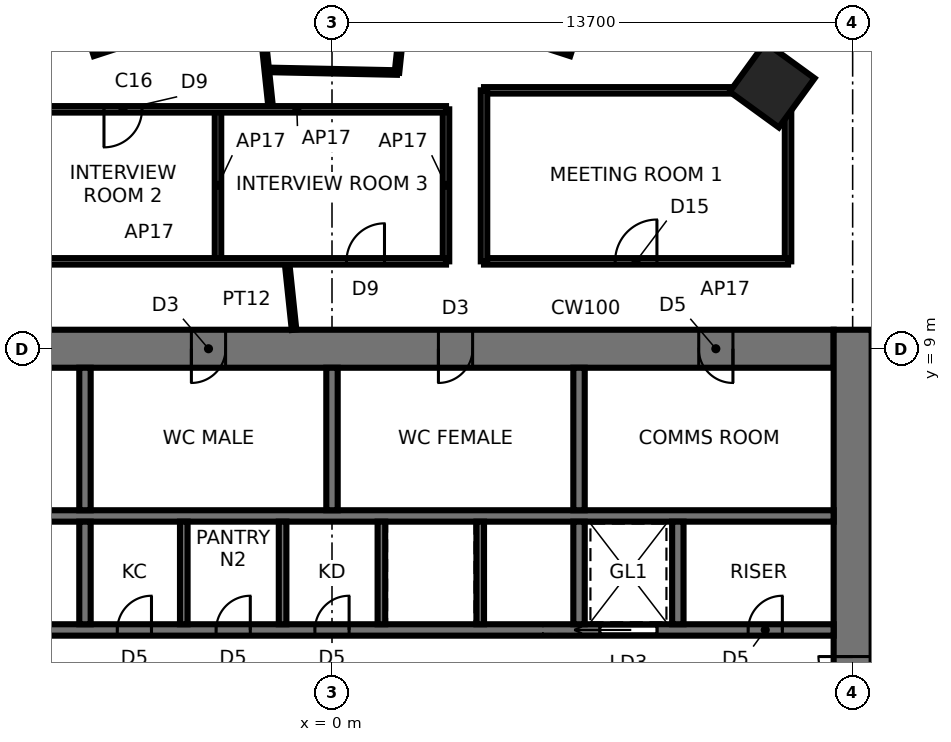
"""IFC4 building model, lengths in metres.
Left out: names, types, materials, properties, quantities, classifications, styles, units other than length and angle.
Written with IfcOpenShell. Run it as: python <this file> out.ifc"""

import sys

from ifc_helpers import new_model, si_unit, direction, frame, frame_2d, origin, origin_2d, place, context, subcontext, project, spatial, rectangle, extrude, element, fill, save


model = new_model("IFC4")
c1 = context("Model", 3, precision=1e-05, world=origin(), true_north=direction((0.0, 1.0)))
c2 = subcontext(c1, "Body", "Model", "MODEL_VIEW")
j1 = project(units=[si_unit("LENGTHUNIT", "METRE"), si_unit("PLANEANGLEUNIT", "RADIAN")], contexts=[c1])
p1 = place(None, origin())
s1 = spatial("IfcSite", under=j1, at=p1, CompositionType="ELEMENT")
p2 = place(p1, origin())
s2 = spatial("IfcBuilding", under=s1, at=p2, CompositionType="ELEMENT")
p3 = place(p2, frame((0.0, 0.0, 92.4)))
s3 = spatial("IfcBuildingStorey", under=s2, at=p3, CompositionType="ELEMENT", Elevation=92.4)
for number, where, z_axis, x_axis in (
    (1, (11.581, 15.94, 0.0), (0.0, 0.0, 1.0), (0.588, 0.809, 0.0)),
    (2, (5.754, 17.708, 0.0), (0.0, 0.0, 1.0), (0.309, 0.951, 0.0)),
    (3, (-5.754, 17.708, 0.0), (0.0, 0.0, 1.0), (-0.309, 0.951, 0.0)),
):
    element("IfcColumn", number, at=place(p3, frame(where, z_axis=z_axis, x_axis=x_axis)), inside=s3, PredefinedType="COLUMN", context=c2, shape_type="SweptSolid", body=[
        extrude(rectangle(XDim=1.6, YDim=1.6, at=origin_2d()), origin(), (0.0, 0.0, 1.0), 3.9),
    ])
p4 = place(p3, frame((13.2, 9.0, 0.0), z_axis=(0.0, 0.0, 1.0), x_axis=(-1.0, 0.0, 0.0)))
e4 = element("IfcWall", 4, at=p4, inside=s3, PredefinedType="SHEAR", context=c2, shape_type="SweptSolid", body=[
    extrude(rectangle(XDim=26.4, YDim=1.0, at=frame_2d((13.2, 0.0))), origin(), (0.0, 0.0, 1.0), 3.9),
])
p5 = place(p4, frame((2.65, 0.0, 0.0)))
e5 = element("IfcOpeningElement", 5, at=p5, cuts=e4, PredefinedType="OPENING", context=c2, shape_type="SweptSolid", body=[
    extrude(rectangle(XDim=0.9, YDim=2.1, at=frame_2d((0.45, 1.05))), frame((0.0, 0.51, 0.0), z_axis=(0.0, -1.0, 0.0), x_axis=(1.0, 0.0, 0.0)), (0.0, 0.0, 1.0), 1.02),
])
p6 = place(p4, frame((9.5, 0.0, 0.0)))
e6 = element("IfcOpeningElement", 6, at=p6, cuts=e4, PredefinedType="OPENING", context=c2, shape_type="SweptSolid", body=[
    extrude(rectangle(XDim=0.9, YDim=2.1, at=frame_2d((0.45, 1.05))), frame((0.0, 0.51, 0.0), z_axis=(0.0, -1.0, 0.0), x_axis=(1.0, 0.0, 0.0)), (0.0, 0.0, 1.0), 1.02),
])
p7 = place(p4, frame((16.0, 0.0, 0.0)))
e7 = element("IfcOpeningElement", 7, at=p7, cuts=e4, PredefinedType="OPENING", context=c2, shape_type="SweptSolid", body=[
    extrude(rectangle(XDim=0.9, YDim=2.1, at=frame_2d((0.45, 1.05))), frame((0.0, 0.51, 0.0), z_axis=(0.0, -1.0, 0.0), x_axis=(1.0, 0.0, 0.0)), (0.0, 0.0, 1.0), 1.02),
])
p8 = place(p4, frame((21.25, 0.0, 0.0)))
e8 = element("IfcOpeningElement", 8, at=p8, cuts=e4, PredefinedType="OPENING", context=c2, shape_type="SweptSolid", body=[
    extrude(rectangle(XDim=0.9, YDim=2.1, at=frame_2d((0.45, 1.05))), frame((0.0, 0.51, 0.0), z_axis=(0.0, -1.0, 0.0), x_axis=(1.0, 0.0, 0.0)), (0.0, 0.0, 1.0), 1.02),
])
p9 = place(p4, frame((24.8, 0.0, 0.0)))
e9 = element("IfcOpeningElement", 9, at=p9, cuts=e4, PredefinedType="OPENING", context=c2, shape_type="SweptSolid", body=[
    extrude(rectangle(XDim=1.0, YDim=2.1, at=frame_2d((0.5, 1.05))), frame((0.0, 0.51, 0.0), z_axis=(0.0, -1.0, 0.0), x_axis=(1.0, 0.0, 0.0)), (0.0, 0.0, 1.0), 1.02),
])
p10 = place(p3, frame((13.7, -9.5, 0.0), z_axis=(0.0, 0.0, 1.0), x_axis=(0.0, 1.0, 0.0)))
e10 = element("IfcWall", 10, at=p10, inside=s3, PredefinedType="SHEAR", context=c2, shape_type="SweptSolid", body=[
    extrude(rectangle(XDim=19.0, YDim=1.0, at=frame_2d((9.5, 0.0))), origin(), (0.0, 0.0, 1.0), 3.9),
])
p11 = place(p10, frame((8.6, 0.0, 0.0)))
e11 = element("IfcOpeningElement", 11, at=p11, cuts=e10, PredefinedType="OPENING", context=c2, shape_type="SweptSolid", body=[
    extrude(rectangle(XDim=1.8, YDim=2.4, at=frame_2d((0.9, 1.2))), frame((0.0, 0.51, 0.0), z_axis=(0.0, -1.0, 0.0), x_axis=(1.0, 0.0, 0.0)), (0.0, 0.0, 1.0), 1.02),
])
p12 = place(p3, frame((-13.2, 1.6, 0.0), z_axis=(0.0, 0.0, 1.0), x_axis=(1.0, 0.0, 0.0)))
e12 = element("IfcWall", 12, at=p12, inside=s3, PredefinedType="SHEAR", context=c2, shape_type="SweptSolid", body=[
    extrude(rectangle(XDim=26.4, YDim=0.3, at=frame_2d((13.2, 0.0))), origin(), (0.0, 0.0, 1.0), 3.9),
])
p13 = place(p12, frame((0.25, 0.0, 0.0)))
e13 = element("IfcOpeningElement", 13, at=p13, cuts=e12, PredefinedType="OPENING", context=c2, shape_type="SweptSolid", body=[
    extrude(rectangle(XDim=1.0, YDim=2.1, at=frame_2d((0.5, 1.05))), frame((0.0, 0.16, 0.0), z_axis=(0.0, -1.0, 0.0), x_axis=(1.0, 0.0, 0.0)), (0.0, 0.0, 1.0), 0.32),
])
p14 = place(p12, frame((20.25, 0.0, 0.0)))
e14 = element("IfcOpeningElement", 14, at=p14, cuts=e12, PredefinedType="OPENING", context=c2, shape_type="SweptSolid", body=[
    extrude(rectangle(XDim=1.5, YDim=2.4, at=frame_2d((0.75, 1.2))), frame((0.0, 0.16, 0.0), z_axis=(0.0, -1.0, 0.0), x_axis=(1.0, 0.0, 0.0)), (0.0, 0.0, 1.0), 0.32),
])
p15 = place(p12, frame((7.55, 0.0, 0.0)))
e15 = element("IfcOpeningElement", 15, at=p15, cuts=e12, PredefinedType="OPENING", context=c2, shape_type="SweptSolid", body=[
    extrude(rectangle(XDim=0.9, YDim=2.1, at=frame_2d((0.45, 1.05))), frame((0.0, 0.16, 0.0), z_axis=(0.0, -1.0, 0.0), x_axis=(1.0, 0.0, 0.0)), (0.0, 0.0, 1.0), 0.32),
])
p16 = place(p12, frame((10.15, 0.0, 0.0)))
e16 = element("IfcOpeningElement", 16, at=p16, cuts=e12, PredefinedType="OPENING", context=c2, shape_type="SweptSolid", body=[
    extrude(rectangle(XDim=0.9, YDim=2.1, at=frame_2d((0.45, 1.05))), frame((0.0, 0.16, 0.0), z_axis=(0.0, -1.0, 0.0), x_axis=(1.0, 0.0, 0.0)), (0.0, 0.0, 1.0), 0.32),
])
p17 = place(p12, frame((12.75, 0.0, 0.0)))
e17 = element("IfcOpeningElement", 17, at=p17, cuts=e12, PredefinedType="OPENING", context=c2, shape_type="SweptSolid", body=[
    extrude(rectangle(XDim=0.9, YDim=2.1, at=frame_2d((0.45, 1.05))), frame((0.0, 0.16, 0.0), z_axis=(0.0, -1.0, 0.0), x_axis=(1.0, 0.0, 0.0)), (0.0, 0.0, 1.0), 0.32),
])
p18 = place(p12, frame((24.15, 0.0, 0.0)))
e18 = element("IfcOpeningElement", 18, at=p18, cuts=e12, PredefinedType="OPENING", context=c2, shape_type="SweptSolid", body=[
    extrude(rectangle(XDim=0.9, YDim=2.1, at=frame_2d((0.45, 1.05))), frame((0.0, 0.16, 0.0), z_axis=(0.0, -1.0, 0.0), x_axis=(1.0, 0.0, 0.0)), (0.0, 0.0, 1.0), 0.32),
])
p19 = place(p3, frame((-13.2, 4.6, 0.0), z_axis=(0.0, 0.0, 1.0), x_axis=(1.0, 0.0, 0.0)))
e19 = element("IfcWall", 19, at=p19, inside=s3, PredefinedType="SHEAR", context=c2, shape_type="SweptSolid", body=[
    extrude(rectangle(XDim=26.4, YDim=0.3, at=frame_2d((13.2, 0.0))), origin(), (0.0, 0.0, 1.0), 3.9),
])
p20 = place(p3, frame((-6.5, 1.75, 0.0), z_axis=(0.0, 0.0, 1.0), x_axis=(0.0, 1.0, 0.0)))
e20 = element("IfcWall", 20, at=p20, inside=s3, PredefinedType="SHEAR", context=c2, shape_type="SweptSolid", body=[
    extrude(rectangle(XDim=2.7, YDim=0.3, at=frame_2d((1.35, 0.0))), origin(), (0.0, 0.0, 1.0), 3.9),
])
p21 = place(p3, frame((-6.5, 4.75, 0.0), z_axis=(0.0, 0.0, 1.0), x_axis=(0.0, 1.0, 0.0)))
e21 = element("IfcWall", 21, at=p21, inside=s3, PredefinedType="SHEAR", context=c2, shape_type="SweptSolid", body=[
    extrude(rectangle(XDim=3.75, YDim=0.3, at=frame_2d((1.875, 0.0))), origin(), (0.0, 0.0, 1.0), 3.9),
])
p22 = place(p3, frame((6.5, 1.75, 0.0), z_axis=(0.0, 0.0, 1.0), x_axis=(0.0, 1.0, 0.0)))
e22 = element("IfcWall", 22, at=p22, inside=s3, PredefinedType="SHEAR", context=c2, shape_type="SweptSolid", body=[
    extrude(rectangle(XDim=2.7, YDim=0.3, at=frame_2d((1.35, 0.0))), origin(), (0.0, 0.0, 1.0), 3.9),
])
p23 = place(p3, frame((6.5, 4.75, 0.0), z_axis=(0.0, 0.0, 1.0), x_axis=(0.0, 1.0, 0.0)))
e23 = element("IfcWall", 23, at=p23, inside=s3, PredefinedType="SHEAR", context=c2, shape_type="SweptSolid", body=[
    extrude(rectangle(XDim=3.75, YDim=0.3, at=frame_2d((1.875, 0.0))), origin(), (0.0, 0.0, 1.0), 3.9),
])
for number, where, z_axis, x_axis in (
    (24, (-3.9, 1.75, 0.0), (0.0, 0.0, 1.0), (0.0, 1.0, 0.0)),
    (25, (-1.3, 1.75, 0.0), (0.0, 0.0, 1.0), (0.0, 1.0, 0.0)),
    (26, (1.3, 1.75, 0.0), (0.0, 0.0, 1.0), (0.0, 1.0, 0.0)),
    (27, (3.9, 1.75, 0.0), (0.0, 0.0, 1.0), (0.0, 1.0, 0.0)),
):
    element("IfcWall", number, at=place(p3, frame(where, z_axis=z_axis, x_axis=x_axis)), inside=s3, PredefinedType="SHEAR", context=c2, shape_type="SweptSolid", body=[
        extrude(rectangle(XDim=2.7, YDim=0.2, at=frame_2d((1.35, 0.0))), origin(), (0.0, 0.0, 1.0), 3.9),
    ])
p24 = place(p3, frame((0.0, 4.75, 0.0), z_axis=(0.0, 0.0, 1.0), x_axis=(0.0, 1.0, 0.0)))
e28 = element("IfcWall", 28, at=p24, inside=s3, PredefinedType="SHEAR", context=c2, shape_type="SweptSolid", body=[
    extrude(rectangle(XDim=3.75, YDim=0.3, at=frame_2d((1.875, 0.0))), origin(), (0.0, 0.0, 1.0), 3.9),
])
p25 = place(p3, frame((9.1, 1.75, 0.0), z_axis=(0.0, 0.0, 1.0), x_axis=(0.0, 1.0, 0.0)))
e29 = element("IfcWall", 29, at=p25, inside=s3, PredefinedType="SHEAR", context=c2, shape_type="SweptSolid", body=[
    extrude(rectangle(XDim=2.7, YDim=0.3, at=frame_2d((1.35, 0.0))), origin(), (0.0, 0.0, 1.0), 3.9),
])
p26 = place(p3, frame((12.0, 15.8, 0.0), z_axis=(0.0, 0.0, 1.0), x_axis=(0.0, -1.0, 0.0)))
e30 = element("IfcWall", 30, at=p26, inside=s3, PredefinedType="PARTITIONING", context=c2, shape_type="SweptSolid", body=[
    extrude(rectangle(XDim=4.5, YDim=0.17, at=frame_2d((2.25, 0.0))), origin(), (0.0, 0.0, 1.0), 3.74),
])
p27 = place(p3, frame((12.0, 11.3, 0.0), z_axis=(0.0, 0.0, 1.0), x_axis=(-1.0, 0.0, 0.0)))
e31 = element("IfcWall", 31, at=p27, inside=s3, PredefinedType="PARTITIONING", context=c2, shape_type="SweptSolid", body=[
    extrude(rectangle(XDim=8.0, YDim=0.17, at=frame_2d((4.0, 0.0))), origin(), (0.0, 0.0, 1.0), 3.74),
])
p28 = place(p27, frame((3.45, 0.0, 0.0)))
e32 = element("IfcOpeningElement", 32, at=p28, cuts=e31, PredefinedType="OPENING", context=c2, shape_type="SweptSolid", body=[
    extrude(rectangle(XDim=1.1, YDim=2.4, at=frame_2d((0.55, 1.2))), frame((0.0, 0.095, 0.0), z_axis=(0.0, -1.0, 0.0), x_axis=(1.0, 0.0, 0.0)), (0.0, 0.0, 1.0), 0.19),
])
p29 = place(p3, frame((4.0, 15.8, 0.0), z_axis=(0.0, 0.0, 1.0), x_axis=(1.0, 0.0, 0.0)))
e33 = element("IfcWall", 33, at=p29, inside=s3, PredefinedType="PARTITIONING", context=c2, shape_type="SweptSolid", body=[
    extrude(rectangle(XDim=8.0, YDim=0.17, at=frame_2d((4.0, 0.0))), origin(), (0.0, 0.0, 1.0), 3.74),
])
p30 = place(p3, frame((4.0, 11.3, 0.0), z_axis=(0.0, 0.0, 1.0), x_axis=(0.0, 1.0, 0.0)))
e34 = element("IfcWall", 34, at=p30, inside=s3, PredefinedType="PARTITIONING", context=c2, shape_type="SweptSolid", body=[
    extrude(rectangle(XDim=4.5, YDim=0.17, at=frame_2d((2.25, 0.0))), origin(), (0.0, 0.0, 1.0), 3.74),
])
p31 = place(p3, frame((3.0, 11.3, 0.0), z_axis=(0.0, 0.0, 1.0), x_axis=(0.0, 1.0, 0.0)))
e35 = element("IfcWall", 35, at=p31, inside=s3, PredefinedType="PARTITIONING", context=c2, shape_type="SweptSolid", body=[
    extrude(rectangle(XDim=4.0, YDim=0.17, at=frame_2d((2.0, 0.0))), origin(), (0.0, 0.0, 1.0), 3.74),
])
p32 = place(p3, frame((1.71, 16.269, 0.0), z_axis=(0.0, 0.0, 1.0), x_axis=(0.104534350613, 0.994521276566, 0.0)))
e36 = element("IfcWall", 36, at=p32, inside=s3, PredefinedType="PARTITIONING", context=c2, shape_type="SweptSolid", body=[
    extrude(rectangle(XDim=4.9, YDim=0.12, at=frame_2d((2.45, 0.0))), origin(), (0.0, 0.0, 1.0), 3.74),
])
p33 = place(p32, frame((2.45, 0.0, 0.0)))
e37 = element("IfcOpeningElement", 37, at=p33, cuts=e36, PredefinedType="OPENING", context=c2, shape_type="SweptSolid", body=[
    extrude(rectangle(XDim=1.0, YDim=2.4, at=frame_2d((0.5, 1.2))), frame((0.0, 0.07, 0.0), z_axis=(0.0, -1.0, 0.0), x_axis=(1.0, 0.0, 0.0)), (0.0, 0.0, 1.0), 0.14),
])
p34 = place(p3, frame((-1.717, 16.339, 0.0), z_axis=(0.0, 0.0, 1.0), x_axis=(0.999789618554, -0.020511426852, 0.0)))
e38 = element("IfcWall", 38, at=p34, inside=s3, PredefinedType="PARTITIONING", context=c2, shape_type="SweptSolid", body=[
    extrude(rectangle(XDim=3.428, YDim=0.12, at=frame_2d((1.714, 0.0))), origin(), (0.0, 0.0, 1.0), 3.74),
])
p35 = place(p3, frame((-1.608, 15.3, 0.0), z_axis=(0.0, 0.0, 1.0), x_axis=(-0.104520170215, 0.994522766968, 0.0)))
e39 = element("IfcWall", 39, at=p35, inside=s3, PredefinedType="PARTITIONING", context=c2, shape_type="SweptSolid", body=[
    extrude(rectangle(XDim=5.945, YDim=0.12, at=frame_2d((2.972, 0.0))), origin(), (0.0, 0.0, 1.0), 3.74),
])
p36 = place(p3, frame((-0.999, 9.5, 0.0), z_axis=(0.0, 0.0, 1.0), x_axis=(-0.104537331683, 0.99452096322, 0.0)))
e40 = element("IfcWall", 40, at=p36, inside=s3, PredefinedType="PARTITIONING", context=c2, shape_type="SweptSolid", body=[
    extrude(rectangle(XDim=1.81, YDim=0.12, at=frame_2d((0.905, 0.0))), origin(), (0.0, 0.0, 1.0), 3.74),
])
p37 = place(p3, frame((-3.0, 15.3, 0.0), z_axis=(0.0, 0.0, 1.0), x_axis=(0.0, -1.0, 0.0)))
e41 = element("IfcWall", 41, at=p37, inside=s3, PredefinedType="PARTITIONING", context=c2, shape_type="SweptSolid", body=[
    extrude(rectangle(XDim=4.0, YDim=0.17, at=frame_2d((2.0, 0.0))), origin(), (0.0, 0.0, 1.0), 3.74),
])
p38 = place(p3, frame((3.0, 15.3, 0.0), z_axis=(0.0, 0.0, 1.0), x_axis=(-1.0, 0.0, 0.0)))
e42 = element("IfcWall", 42, at=p38, inside=s3, PredefinedType="PARTITIONING", context=c2, shape_type="SweptSolid", body=[
    extrude(rectangle(XDim=16.0, YDim=0.17, at=frame_2d((8.0, 0.0))), origin(), (0.0, 0.0, 1.0), 3.286),
])
p39 = place(p38, frame((8.0, 0.0, 0.0)))
e43 = element("IfcOpeningElement", 43, at=p39, cuts=e42, PredefinedType="OPENING", context=c2, shape_type="SweptSolid", body=[
    extrude(rectangle(XDim=1.0, YDim=2.4, at=frame_2d((0.5, 1.2))), frame((0.0, 0.095, 0.0), z_axis=(0.0, -1.0, 0.0), x_axis=(1.0, 0.0, 0.0)), (0.0, 0.0, 1.0), 0.19),
])
p40 = place(p3, frame((-13.0, 11.3, 0.0), z_axis=(0.0, 0.0, 1.0), x_axis=(1.0, 0.0, 0.0)))
e44 = element("IfcWall", 44, at=p40, inside=s3, PredefinedType="PARTITIONING", context=c2, shape_type="SweptSolid", body=[
    extrude(rectangle(XDim=16.0, YDim=0.17, at=frame_2d((8.0, 0.0))), origin(), (0.0, 0.0, 1.0), 3.74),
])
p41 = place(p40, frame((2.0, 0.0, 0.0)))
e45 = element("IfcOpeningElement", 45, at=p41, cuts=e44, PredefinedType="OPENING", context=c2, shape_type="SweptSolid", body=[
    extrude(rectangle(XDim=1.0, YDim=2.4, at=frame_2d((0.5, 1.2))), frame((0.0, 0.095, 0.0), z_axis=(0.0, -1.0, 0.0), x_axis=(1.0, 0.0, 0.0)), (0.0, 0.0, 1.0), 0.19),
])
p42 = place(p40, frame((13.381, 0.0, 0.0)))
e46 = element("IfcOpeningElement", 46, at=p42, cuts=e44, PredefinedType="OPENING", context=c2, shape_type="SweptSolid", body=[
    extrude(rectangle(XDim=1.0, YDim=2.4, at=frame_2d((0.5, 1.2))), frame((0.0, 0.095, 0.0), z_axis=(0.0, -1.0, 0.0), x_axis=(1.0, 0.0, 0.0)), (0.0, 0.0, 1.0), 0.19),
])
p43 = place(p11, origin())
e47 = element("IfcDoor", 47, at=p43, inside=s3, OperationType="DOUBLE_DOOR_SINGLE_SWING", PredefinedType="DOOR", context=c2, shape_type="SweptSolid", body=[
    extrude(rectangle(XDim=1.72, YDim=2.36, at=frame_2d((0.9, 1.18))), frame((0.0, 0.025, 0.0), z_axis=(0.0, -1.0, 0.0), x_axis=(1.0, 0.0, 0.0)), (0.0, 0.0, 1.0), 0.05),
    extrude(rectangle(XDim=0.04, YDim=2.4, at=frame_2d((0.02, 1.2))), frame((0.0, 0.25, 0.0), z_axis=(0.0, -1.0, 0.0), x_axis=(1.0, 0.0, 0.0)), (0.0, 0.0, 1.0), 0.5),
    extrude(rectangle(XDim=0.04, YDim=2.4, at=frame_2d((1.78, 1.2))), frame((0.0, 0.25, 0.0), z_axis=(0.0, -1.0, 0.0), x_axis=(1.0, 0.0, 0.0)), (0.0, 0.0, 1.0), 0.5),
    extrude(rectangle(XDim=1.72, YDim=0.04, at=frame_2d((0.9, 2.38))), frame((0.0, 0.25, 0.0), z_axis=(0.0, -1.0, 0.0), x_axis=(1.0, 0.0, 0.0)), (0.0, 0.0, 1.0), 0.5),
])
fill(e11, e47)
p44 = place(p14, origin())
e48 = element("IfcDoor", 48, at=p44, inside=s3, OperationType="SLIDING_TO_LEFT", PredefinedType="DOOR", context=c2, shape_type="SweptSolid", body=[
    extrude(rectangle(XDim=1.5, YDim=2.4, at=frame_2d((0.75, 1.2))), frame((0.0, 0.025, 0.0), z_axis=(0.0, -1.0, 0.0), x_axis=(1.0, 0.0, 0.0)), (0.0, 0.0, 1.0), 0.05),
])
fill(e14, e48)
p45 = place(p15, origin())
e49 = element("IfcDoor", 49, at=p45, inside=s3, OperationType="SINGLE_SWING_RIGHT", PredefinedType="DOOR", context=c2, shape_type="SweptSolid", body=[
    extrude(rectangle(XDim=0.9, YDim=2.1, at=frame_2d((0.45, 1.05))), frame((0.0, 0.025, 0.0), z_axis=(0.0, -1.0, 0.0), x_axis=(1.0, 0.0, 0.0)), (0.0, 0.0, 1.0), 0.05),
])
fill(e15, e49)
p46 = place(p16, origin())
e50 = element("IfcDoor", 50, at=p46, inside=s3, OperationType="SINGLE_SWING_RIGHT", PredefinedType="DOOR", context=c2, shape_type="SweptSolid", body=[
    extrude(rectangle(XDim=0.9, YDim=2.1, at=frame_2d((0.45, 1.05))), frame((0.0, 0.025, 0.0), z_axis=(0.0, -1.0, 0.0), x_axis=(1.0, 0.0, 0.0)), (0.0, 0.0, 1.0), 0.05),
])
fill(e16, e50)
p47 = place(p17, origin())
e51 = element("IfcDoor", 51, at=p47, inside=s3, OperationType="SINGLE_SWING_RIGHT", PredefinedType="DOOR", context=c2, shape_type="SweptSolid", body=[
    extrude(rectangle(XDim=0.9, YDim=2.1, at=frame_2d((0.45, 1.05))), frame((0.0, 0.025, 0.0), z_axis=(0.0, -1.0, 0.0), x_axis=(1.0, 0.0, 0.0)), (0.0, 0.0, 1.0), 0.05),
])
fill(e17, e51)
p48 = place(p18, origin())
e52 = element("IfcDoor", 52, at=p48, inside=s3, OperationType="SINGLE_SWING_RIGHT", PredefinedType="DOOR", context=c2, shape_type="SweptSolid", body=[
    extrude(rectangle(XDim=0.9, YDim=2.1, at=frame_2d((0.45, 1.05))), frame((0.0, 0.025, 0.0), z_axis=(0.0, -1.0, 0.0), x_axis=(1.0, 0.0, 0.0)), (0.0, 0.0, 1.0), 0.05),
])
fill(e18, e52)
p49 = place(p5, origin())
e53 = element("IfcDoor", 53, at=p49, inside=s3, OperationType="SINGLE_SWING_LEFT", PredefinedType="DOOR", context=c2, shape_type="SweptSolid", body=[
    extrude(rectangle(XDim=0.82, YDim=2.06, at=frame_2d((0.45, 1.03))), frame((0.0, 0.025, 0.0), z_axis=(0.0, -1.0, 0.0), x_axis=(1.0, 0.0, 0.0)), (0.0, 0.0, 1.0), 0.05),
    extrude(rectangle(XDim=0.04, YDim=2.1, at=frame_2d((0.02, 1.05))), frame((0.0, 0.25, 0.0), z_axis=(0.0, -1.0, 0.0), x_axis=(1.0, 0.0, 0.0)), (0.0, 0.0, 1.0), 0.5),
    extrude(rectangle(XDim=0.04, YDim=2.1, at=frame_2d((0.88, 1.05))), frame((0.0, 0.25, 0.0), z_axis=(0.0, -1.0, 0.0), x_axis=(1.0, 0.0, 0.0)), (0.0, 0.0, 1.0), 0.5),
    extrude(rectangle(XDim=0.82, YDim=0.04, at=frame_2d((0.45, 2.08))), frame((0.0, 0.25, 0.0), z_axis=(0.0, -1.0, 0.0), x_axis=(1.0, 0.0, 0.0)), (0.0, 0.0, 1.0), 0.5),
])
fill(e5, e53)
p50 = place(p6, origin())
e54 = element("IfcDoor", 54, at=p50, inside=s3, OperationType="SINGLE_SWING_RIGHT", PredefinedType="DOOR", context=c2, shape_type="SweptSolid", body=[
    extrude(rectangle(XDim=0.82, YDim=2.06, at=frame_2d((0.45, 1.03))), frame((0.0, 0.025, 0.0), z_axis=(0.0, -1.0, 0.0), x_axis=(1.0, 0.0, 0.0)), (0.0, 0.0, 1.0), 0.05),
    extrude(rectangle(XDim=0.04, YDim=2.1, at=frame_2d((0.02, 1.05))), frame((0.0, 0.25, 0.0), z_axis=(0.0, -1.0, 0.0), x_axis=(1.0, 0.0, 0.0)), (0.0, 0.0, 1.0), 0.5),
    extrude(rectangle(XDim=0.04, YDim=2.1, at=frame_2d((0.88, 1.05))), frame((0.0, 0.25, 0.0), z_axis=(0.0, -1.0, 0.0), x_axis=(1.0, 0.0, 0.0)), (0.0, 0.0, 1.0), 0.5),
    extrude(rectangle(XDim=0.82, YDim=0.04, at=frame_2d((0.45, 2.08))), frame((0.0, 0.25, 0.0), z_axis=(0.0, -1.0, 0.0), x_axis=(1.0, 0.0, 0.0)), (0.0, 0.0, 1.0), 0.5),
])
fill(e6, e54)
p51 = place(p7, origin())
e55 = element("IfcDoor", 55, at=p51, inside=s3, OperationType="SINGLE_SWING_RIGHT", PredefinedType="DOOR", context=c2, shape_type="SweptSolid", body=[
    extrude(rectangle(XDim=0.82, YDim=2.06, at=frame_2d((0.45, 1.03))), frame((0.0, 0.025, 0.0), z_axis=(0.0, -1.0, 0.0), x_axis=(1.0, 0.0, 0.0)), (0.0, 0.0, 1.0), 0.05),
    extrude(rectangle(XDim=0.04, YDim=2.1, at=frame_2d((0.02, 1.05))), frame((0.0, 0.25, 0.0), z_axis=(0.0, -1.0, 0.0), x_axis=(1.0, 0.0, 0.0)), (0.0, 0.0, 1.0), 0.5),
    extrude(rectangle(XDim=0.04, YDim=2.1, at=frame_2d((0.88, 1.05))), frame((0.0, 0.25, 0.0), z_axis=(0.0, -1.0, 0.0), x_axis=(1.0, 0.0, 0.0)), (0.0, 0.0, 1.0), 0.5),
    extrude(rectangle(XDim=0.82, YDim=0.04, at=frame_2d((0.45, 2.08))), frame((0.0, 0.25, 0.0), z_axis=(0.0, -1.0, 0.0), x_axis=(1.0, 0.0, 0.0)), (0.0, 0.0, 1.0), 0.5),
])
fill(e7, e55)
p52 = place(p39, origin())
e56 = element("IfcDoor", 56, at=p52, inside=s3, OperationType="SINGLE_SWING_RIGHT", PredefinedType="DOOR", context=c2, shape_type="SweptSolid", body=[
    extrude(rectangle(XDim=1.0, YDim=2.4, at=frame_2d((0.5, 1.2))), frame((0.0, 0.025, 0.0), z_axis=(0.0, -1.0, 0.0), x_axis=(1.0, 0.0, 0.0)), (0.0, 0.0, 1.0), 0.05),
])
fill(e43, e56)
p53 = place(p42, origin())
e57 = element("IfcDoor", 57, at=p53, inside=s3, OperationType="SINGLE_SWING_RIGHT", PredefinedType="DOOR", context=c2, shape_type="SweptSolid", body=[
    extrude(rectangle(XDim=1.0, YDim=2.4, at=frame_2d((0.5, 1.2))), frame((0.0, 0.025, 0.0), z_axis=(0.0, -1.0, 0.0), x_axis=(1.0, 0.0, 0.0)), (0.0, 0.0, 1.0), 0.05),
])
fill(e46, e57)
p54 = place(p28, frame((1.1, 0.0, 0.0), z_axis=(0.0, 0.0, 1.0), x_axis=(-1.0, 0.0, 0.0)))
e58 = element("IfcDoor", 58, at=p54, inside=s3, OperationType="SINGLE_SWING_RIGHT", PredefinedType="DOOR", context=c2, shape_type="SweptSolid", body=[
    extrude(rectangle(XDim=1.1, YDim=2.4, at=frame_2d((0.55, 1.2))), frame((0.0, 0.025, 0.0), z_axis=(0.0, -1.0, 0.0), x_axis=(1.0, 0.0, 0.0)), (0.0, 0.0, 1.0), 0.05),
])
fill(e32, e58)
save(model, sys.argv[1])
